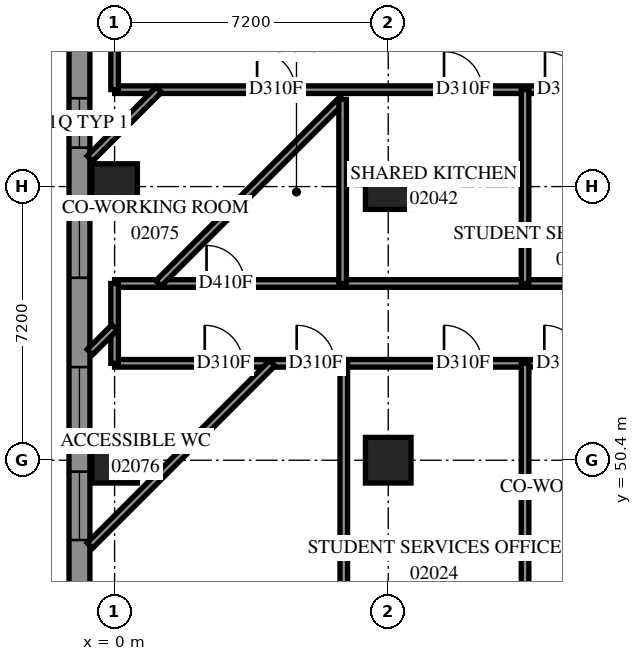
"""IFC4 building model, lengths in metres.
Left out: names, types, materials, properties, quantities, classifications, styles, units other than length and angle.
Written with IfcOpenShell. Run it as: python <this file> out.ifc"""

import sys

from ifc_helpers import new_model, si_unit, direction, frame, frame_2d, origin, origin_2d, place, context, subcontext, project, spatial, polyline, rectangle, outline, extrude, element, fill, save


model = new_model("IFC4")
c1 = context("Model", 3, precision=1e-05, world=origin(), true_north=direction((0.0, 1.0)))
c2 = subcontext(c1, "Body", "Model", "MODEL_VIEW")
j1 = project(units=[si_unit("LENGTHUNIT", "METRE"), si_unit("PLANEANGLEUNIT", "RADIAN")], contexts=[c1])
p1 = place(None, origin())
s1 = spatial("IfcSite", under=j1, at=p1, CompositionType="ELEMENT")
p2 = place(p1, origin())
s2 = spatial("IfcBuilding", under=s1, at=p2, CompositionType="ELEMENT")
p3 = place(p2, frame((0.0, 0.0, 10.2)))
s3 = spatial("IfcBuildingStorey", under=s2, at=p3, CompositionType="ELEMENT", Elevation=10.2)
for number, where, z_axis, x_axis in (
    (1, (0.0, 50.4, 0.0), (0.0, 0.0, 1.0), (1.0, 0.0, 0.0)),
    (2, (0.0, 57.6, 0.0), (0.0, 0.0, 1.0), (1.0, 0.0, 0.0)),
    (3, (7.2, 50.4, 0.0), (0.0, 0.0, 1.0), (1.0, 0.0, 0.0)),
    (4, (7.2, 57.6, 0.0), (0.0, 0.0, 1.0), (1.0, 0.0, 0.0)),
):
    element("IfcColumn", number, at=place(p3, frame(where, z_axis=z_axis, x_axis=x_axis)), inside=s3, PredefinedType="COLUMN", context=c2, shape_type="SweptSolid", body=[
        extrude(rectangle(XDim=1.2, YDim=1.2, at=origin_2d()), origin(), (0.0, 0.0, 1.0), 3.8),
    ])
p4 = place(p3, frame((-0.925, 71.725, 0.0), z_axis=(0.0, 0.0, 1.0), x_axis=(0.0, -1.0, 0.0)))
e5 = element("IfcWall", 5, at=p4, inside=s3, PredefinedType="SOLIDWALL", context=c2, shape_type="SweptSolid", body=[
    extrude(outline(polyline([(-0.275, -0.275), (28.525, -0.275), (27.975, 0.275), (0.275, 0.275), (-0.275, -0.275)])), origin(), (0.0, 0.0, 1.0), 3.8),
])
p5 = place(p4, frame((1.0, 0.0, 0.7)))
e6 = element("IfcOpeningElement", 6, at=p5, cuts=e5, PredefinedType="OPENING", context=c2, shape_type="SweptSolid", body=[
    extrude(rectangle(XDim=1.8, YDim=2.6, at=frame_2d((0.9, 1.3))), frame((0.0, 0.285, 0.0), z_axis=(0.0, -1.0, 0.0), x_axis=(1.0, 0.0, 0.0)), (0.0, 0.0, 1.0), 0.57),
])
p6 = place(p4, frame((4.225, 0.0, 0.7)))
e7 = element("IfcOpeningElement", 7, at=p6, cuts=e5, PredefinedType="OPENING", context=c2, shape_type="SweptSolid", body=[
    extrude(rectangle(XDim=1.8, YDim=2.6, at=frame_2d((0.9, 1.3))), frame((0.0, 0.285, 0.0), z_axis=(0.0, -1.0, 0.0), x_axis=(1.0, 0.0, 0.0)), (0.0, 0.0, 1.0), 0.57),
])
p7 = place(p4, frame((7.525, 0.0, 0.7)))
e8 = element("IfcOpeningElement", 8, at=p7, cuts=e5, PredefinedType="OPENING", context=c2, shape_type="SweptSolid", body=[
    extrude(rectangle(XDim=1.8, YDim=2.6, at=frame_2d((0.9, 1.3))), frame((0.0, 0.285, 0.0), z_axis=(0.0, -1.0, 0.0), x_axis=(1.0, 0.0, 0.0)), (0.0, 0.0, 1.0), 0.57),
])
p8 = place(p4, frame((14.725, 0.0, 0.7)))
e9 = element("IfcOpeningElement", 9, at=p8, cuts=e5, PredefinedType="OPENING", context=c2, shape_type="SweptSolid", body=[
    extrude(rectangle(XDim=1.8, YDim=2.6, at=frame_2d((0.9, 1.3))), frame((0.0, 0.285, 0.0), z_axis=(0.0, -1.0, 0.0), x_axis=(1.0, 0.0, 0.0)), (0.0, 0.0, 1.0), 0.57),
])
p9 = place(p4, frame((18.875, 0.0, 0.7)))
e10 = element("IfcOpeningElement", 10, at=p9, cuts=e5, PredefinedType="OPENING", context=c2, shape_type="SweptSolid", body=[
    extrude(rectangle(XDim=1.8, YDim=2.6, at=frame_2d((0.9, 1.3))), frame((0.0, 0.285, 0.0), z_axis=(0.0, -1.0, 0.0), x_axis=(1.0, 0.0, 0.0)), (0.0, 0.0, 1.0), 0.57),
])
p10 = place(p4, frame((21.625, 0.0, 0.7)))
e11 = element("IfcOpeningElement", 11, at=p10, cuts=e5, PredefinedType="OPENING", context=c2, shape_type="SweptSolid", body=[
    extrude(rectangle(XDim=1.8, YDim=2.6, at=frame_2d((0.9, 1.3))), frame((0.0, 0.285, 0.0), z_axis=(0.0, -1.0, 0.0), x_axis=(1.0, 0.0, 0.0)), (0.0, 0.0, 1.0), 0.57),
])
p11 = place(p4, frame((25.45, 0.0, 0.7)))
e12 = element("IfcOpeningElement", 12, at=p11, cuts=e5, PredefinedType="OPENING", context=c2, shape_type="SweptSolid", body=[
    extrude(rectangle(XDim=1.8, YDim=2.6, at=frame_2d((0.9, 1.3))), frame((0.0, 0.285, 0.0), z_axis=(0.0, -1.0, 0.0), x_axis=(1.0, 0.0, 0.0)), (0.0, 0.0, 1.0), 0.57),
])
p12 = place(p4, frame((11.8, 0.0, 0.45)))
e13 = element("IfcOpeningElement", 13, at=p12, cuts=e5, PredefinedType="OPENING", context=c2, shape_type="SweptSolid", body=[
    extrude(rectangle(XDim=1.3, YDim=2.5, at=frame_2d((0.65, 1.25))), frame((0.0, 0.285, 0.0), z_axis=(0.0, -1.0, 0.0), x_axis=(1.0, 0.0, 0.0)), (0.0, 0.0, 1.0), 0.57),
])
p13 = place(p3, frame((0.0, 55.05, 0.0), z_axis=(0.0, 0.0, 1.0), x_axis=(1.0, 0.0, 0.0)))
e14 = element("IfcWall", 14, at=p13, inside=s3, PredefinedType="PARTITIONING", context=c2, shape_type="SweptSolid", body=[
    extrude(rectangle(XDim=54.5, YDim=0.2, at=frame_2d((27.25, 0.0))), origin(), (0.0, 0.0, 1.0), 3.8),
])
p14 = place(p13, frame((52.452, 0.0, 0.0)))
e15 = element("IfcOpeningElement", 15, at=p14, cuts=e14, PredefinedType="OPENING", context=c2, shape_type="SweptSolid", body=[
    extrude(rectangle(XDim=1.0, YDim=2.1, at=frame_2d((0.5, 1.05))), frame((0.0, 0.11, 0.0), z_axis=(0.0, -1.0, 0.0), x_axis=(1.0, 0.0, 0.0)), (0.0, 0.0, 1.0), 0.22),
])
p15 = place(p13, frame((2.42, 0.0, 0.0)))
e16 = element("IfcOpeningElement", 16, at=p15, cuts=e14, PredefinedType="OPENING", context=c2, shape_type="SweptSolid", body=[
    extrude(rectangle(XDim=1.0, YDim=2.1, at=frame_2d((0.5, 1.05))), frame((0.0, 0.11, 0.0), z_axis=(0.0, -1.0, 0.0), x_axis=(1.0, 0.0, 0.0)), (0.0, 0.0, 1.0), 0.22),
])
p16 = place(p3, frame((0.0, 52.95, 0.0), z_axis=(0.0, 0.0, 1.0), x_axis=(1.0, 0.0, 0.0)))
e17 = element("IfcWall", 17, at=p16, inside=s3, PredefinedType="PARTITIONING", context=c2, shape_type="SweptSolid", body=[
    extrude(rectangle(XDim=54.5, YDim=0.2, at=frame_2d((27.25, 0.0))), origin(), (0.0, 0.0, 1.0), 3.8),
])
p17 = place(p16, frame((8.669, 0.0, 0.0)))
e18 = element("IfcOpeningElement", 18, at=p17, cuts=e17, PredefinedType="OPENING", context=c2, shape_type="SweptSolid", body=[
    extrude(rectangle(XDim=1.0, YDim=2.1, at=frame_2d((0.5, 1.05))), frame((0.0, 0.11, 0.0), z_axis=(0.0, -1.0, 0.0), x_axis=(1.0, 0.0, 0.0)), (0.0, 0.0, 1.0), 0.22),
])
p18 = place(p16, frame((11.307, 0.0, 0.0)))
e19 = element("IfcOpeningElement", 19, at=p18, cuts=e17, PredefinedType="OPENING", context=c2, shape_type="SweptSolid", body=[
    extrude(rectangle(XDim=1.0, YDim=2.1, at=frame_2d((0.5, 1.05))), frame((0.0, 0.11, 0.0), z_axis=(0.0, -1.0, 0.0), x_axis=(1.0, 0.0, 0.0)), (0.0, 0.0, 1.0), 0.22),
])
p19 = place(p16, frame((16.433, 0.0, 0.0)))
e20 = element("IfcOpeningElement", 20, at=p19, cuts=e17, PredefinedType="OPENING", context=c2, shape_type="SweptSolid", body=[
    extrude(rectangle(XDim=1.0, YDim=2.1, at=frame_2d((0.5, 1.05))), frame((0.0, 0.11, 0.0), z_axis=(0.0, -1.0, 0.0), x_axis=(1.0, 0.0, 0.0)), (0.0, 0.0, 1.0), 0.22),
])
p20 = place(p16, frame((22.025, 0.0, 0.0)))
e21 = element("IfcOpeningElement", 21, at=p20, cuts=e17, PredefinedType="OPENING", context=c2, shape_type="SweptSolid", body=[
    extrude(rectangle(XDim=1.0, YDim=2.1, at=frame_2d((0.5, 1.05))), frame((0.0, 0.11, 0.0), z_axis=(0.0, -1.0, 0.0), x_axis=(1.0, 0.0, 0.0)), (0.0, 0.0, 1.0), 0.22),
])
p21 = place(p16, frame((30.565, 0.0, 0.0)))
e22 = element("IfcOpeningElement", 22, at=p21, cuts=e17, PredefinedType="OPENING", context=c2, shape_type="SweptSolid", body=[
    extrude(rectangle(XDim=1.0, YDim=2.1, at=frame_2d((0.5, 1.05))), frame((0.0, 0.11, 0.0), z_axis=(0.0, -1.0, 0.0), x_axis=(1.0, 0.0, 0.0)), (0.0, 0.0, 1.0), 0.22),
])
p22 = place(p16, frame((32.925, 0.0, 0.0)))
e23 = element("IfcOpeningElement", 23, at=p22, cuts=e17, PredefinedType="OPENING", context=c2, shape_type="SweptSolid", body=[
    extrude(rectangle(XDim=1.0, YDim=2.1, at=frame_2d((0.5, 1.05))), frame((0.0, 0.11, 0.0), z_axis=(0.0, -1.0, 0.0), x_axis=(1.0, 0.0, 0.0)), (0.0, 0.0, 1.0), 0.22),
])
p23 = place(p16, frame((37.765, 0.0, 0.0)))
e24 = element("IfcOpeningElement", 24, at=p23, cuts=e17, PredefinedType="OPENING", context=c2, shape_type="SweptSolid", body=[
    extrude(rectangle(XDim=1.0, YDim=2.1, at=frame_2d((0.5, 1.05))), frame((0.0, 0.11, 0.0), z_axis=(0.0, -1.0, 0.0), x_axis=(1.0, 0.0, 0.0)), (0.0, 0.0, 1.0), 0.22),
])
p24 = place(p16, frame((40.125, 0.0, 0.0)))
e25 = element("IfcOpeningElement", 25, at=p24, cuts=e17, PredefinedType="OPENING", context=c2, shape_type="SweptSolid", body=[
    extrude(rectangle(XDim=1.0, YDim=2.1, at=frame_2d((0.5, 1.05))), frame((0.0, 0.11, 0.0), z_axis=(0.0, -1.0, 0.0), x_axis=(1.0, 0.0, 0.0)), (0.0, 0.0, 1.0), 0.22),
])
p25 = place(p16, frame((44.965, 0.0, 0.0)))
e26 = element("IfcOpeningElement", 26, at=p25, cuts=e17, PredefinedType="OPENING", context=c2, shape_type="SweptSolid", body=[
    extrude(rectangle(XDim=1.0, YDim=2.1, at=frame_2d((0.5, 1.05))), frame((0.0, 0.11, 0.0), z_axis=(0.0, -1.0, 0.0), x_axis=(1.0, 0.0, 0.0)), (0.0, 0.0, 1.0), 0.22),
])
p26 = place(p16, frame((47.325, 0.0, 0.0)))
e27 = element("IfcOpeningElement", 27, at=p26, cuts=e17, PredefinedType="OPENING", context=c2, shape_type="SweptSolid", body=[
    extrude(rectangle(XDim=1.0, YDim=2.1, at=frame_2d((0.5, 1.05))), frame((0.0, 0.11, 0.0), z_axis=(0.0, -1.0, 0.0), x_axis=(1.0, 0.0, 0.0)), (0.0, 0.0, 1.0), 0.22),
])
p27 = place(p16, frame((52.165, 0.0, 0.0)))
e28 = element("IfcOpeningElement", 28, at=p27, cuts=e17, PredefinedType="OPENING", context=c2, shape_type="SweptSolid", body=[
    extrude(rectangle(XDim=1.0, YDim=2.1, at=frame_2d((0.5, 1.05))), frame((0.0, 0.11, 0.0), z_axis=(0.0, -1.0, 0.0), x_axis=(1.0, 0.0, 0.0)), (0.0, 0.0, 1.0), 0.22),
])
p28 = place(p16, frame((2.372, 0.0, 0.0)))
e29 = element("IfcOpeningElement", 29, at=p28, cuts=e17, PredefinedType="OPENING", context=c2, shape_type="SweptSolid", body=[
    extrude(rectangle(XDim=1.0, YDim=2.1, at=frame_2d((0.5, 1.05))), frame((0.0, 0.11, 0.0), z_axis=(0.0, -1.0, 0.0), x_axis=(1.0, 0.0, 0.0)), (0.0, 0.0, 1.0), 0.22),
])
p29 = place(p16, frame((4.792, 0.0, 0.0)))
e30 = element("IfcOpeningElement", 30, at=p29, cuts=e17, PredefinedType="OPENING", context=c2, shape_type="SweptSolid", body=[
    extrude(rectangle(XDim=1.0, YDim=2.1, at=frame_2d((0.5, 1.05))), frame((0.0, 0.11, 0.0), z_axis=(0.0, -1.0, 0.0), x_axis=(1.0, 0.0, 0.0)), (0.0, 0.0, 1.0), 0.22),
])
p30 = place(p3, frame((0.002, 60.15, 0.0), z_axis=(0.0, 0.0, 1.0), x_axis=(1.0, 0.0, 0.0)))
e31 = element("IfcWall", 31, at=p30, inside=s3, PredefinedType="PARTITIONING", context=c2, shape_type="SweptSolid", body=[
    extrude(rectangle(XDim=54.498, YDim=0.2, at=frame_2d((27.249, 0.0))), origin(), (0.0, 0.0, 1.0), 3.8),
])
p31 = place(p30, frame((8.667, 0.0, 0.0)))
e32 = element("IfcOpeningElement", 32, at=p31, cuts=e31, PredefinedType="OPENING", context=c2, shape_type="SweptSolid", body=[
    extrude(rectangle(XDim=1.0, YDim=2.1, at=frame_2d((0.5, 1.05))), frame((0.0, 0.11, 0.0), z_axis=(0.0, -1.0, 0.0), x_axis=(1.0, 0.0, 0.0)), (0.0, 0.0, 1.0), 0.22),
])
p32 = place(p30, frame((11.323, 0.0, 0.0)))
e33 = element("IfcOpeningElement", 33, at=p32, cuts=e31, PredefinedType="OPENING", context=c2, shape_type="SweptSolid", body=[
    extrude(rectangle(XDim=1.0, YDim=2.1, at=frame_2d((0.5, 1.05))), frame((0.0, 0.11, 0.0), z_axis=(0.0, -1.0, 0.0), x_axis=(1.0, 0.0, 0.0)), (0.0, 0.0, 1.0), 0.22),
])
p33 = place(p30, frame((16.163, 0.0, 0.0)))
e34 = element("IfcOpeningElement", 34, at=p33, cuts=e31, PredefinedType="OPENING", context=c2, shape_type="SweptSolid", body=[
    extrude(rectangle(XDim=1.0, YDim=2.1, at=frame_2d((0.5, 1.05))), frame((0.0, 0.11, 0.0), z_axis=(0.0, -1.0, 0.0), x_axis=(1.0, 0.0, 0.0)), (0.0, 0.0, 1.0), 0.22),
])
p34 = place(p30, frame((22.14, 0.0, 0.0)))
e35 = element("IfcOpeningElement", 35, at=p34, cuts=e31, PredefinedType="OPENING", context=c2, shape_type="SweptSolid", body=[
    extrude(rectangle(XDim=1.0, YDim=2.1, at=frame_2d((0.5, 1.05))), frame((0.0, 0.11, 0.0), z_axis=(0.0, -1.0, 0.0), x_axis=(1.0, 0.0, 0.0)), (0.0, 0.0, 1.0), 0.22),
])
p35 = place(p30, frame((30.563, 0.0, 0.0)))
e36 = element("IfcOpeningElement", 36, at=p35, cuts=e31, PredefinedType="OPENING", context=c2, shape_type="SweptSolid", body=[
    extrude(rectangle(XDim=1.0, YDim=2.1, at=frame_2d((0.5, 1.05))), frame((0.0, 0.11, 0.0), z_axis=(0.0, -1.0, 0.0), x_axis=(1.0, 0.0, 0.0)), (0.0, 0.0, 1.0), 0.22),
])
p36 = place(p30, frame((33.233, 0.0, 0.0)))
e37 = element("IfcOpeningElement", 37, at=p36, cuts=e31, PredefinedType="OPENING", context=c2, shape_type="SweptSolid", body=[
    extrude(rectangle(XDim=1.0, YDim=2.1, at=frame_2d((0.5, 1.05))), frame((0.0, 0.11, 0.0), z_axis=(0.0, -1.0, 0.0), x_axis=(1.0, 0.0, 0.0)), (0.0, 0.0, 1.0), 0.22),
])
p37 = place(p30, frame((38.073, 0.0, 0.0)))
e38 = element("IfcOpeningElement", 38, at=p37, cuts=e31, PredefinedType="OPENING", context=c2, shape_type="SweptSolid", body=[
    extrude(rectangle(XDim=1.0, YDim=2.1, at=frame_2d((0.5, 1.05))), frame((0.0, 0.11, 0.0), z_axis=(0.0, -1.0, 0.0), x_axis=(1.0, 0.0, 0.0)), (0.0, 0.0, 1.0), 0.22),
])
p38 = place(p30, frame((40.123, 0.0, 0.0)))
e39 = element("IfcOpeningElement", 39, at=p38, cuts=e31, PredefinedType="OPENING", context=c2, shape_type="SweptSolid", body=[
    extrude(rectangle(XDim=1.0, YDim=2.1, at=frame_2d((0.5, 1.05))), frame((0.0, 0.11, 0.0), z_axis=(0.0, -1.0, 0.0), x_axis=(1.0, 0.0, 0.0)), (0.0, 0.0, 1.0), 0.22),
])
p39 = place(p30, frame((44.963, 0.0, 0.0)))
e40 = element("IfcOpeningElement", 40, at=p39, cuts=e31, PredefinedType="OPENING", context=c2, shape_type="SweptSolid", body=[
    extrude(rectangle(XDim=1.0, YDim=2.1, at=frame_2d((0.5, 1.05))), frame((0.0, 0.11, 0.0), z_axis=(0.0, -1.0, 0.0), x_axis=(1.0, 0.0, 0.0)), (0.0, 0.0, 1.0), 0.22),
])
p40 = place(p30, frame((47.323, 0.0, 0.0)))
e41 = element("IfcOpeningElement", 41, at=p40, cuts=e31, PredefinedType="OPENING", context=c2, shape_type="SweptSolid", body=[
    extrude(rectangle(XDim=1.0, YDim=2.1, at=frame_2d((0.5, 1.05))), frame((0.0, 0.11, 0.0), z_axis=(0.0, -1.0, 0.0), x_axis=(1.0, 0.0, 0.0)), (0.0, 0.0, 1.0), 0.22),
])
p41 = place(p30, frame((3.747, 0.0, 0.0)))
e42 = element("IfcOpeningElement", 42, at=p41, cuts=e31, PredefinedType="OPENING", context=c2, shape_type="SweptSolid", body=[
    extrude(rectangle(XDim=1.0, YDim=2.1, at=frame_2d((0.5, 1.05))), frame((0.0, 0.11, 0.0), z_axis=(0.0, -1.0, 0.0), x_axis=(1.0, 0.0, 0.0)), (0.0, 0.0, 1.0), 0.22),
])
for number, where, z_axis, x_axis in (
    (43, (6.03, 42.55, 0.0), (0.0, 0.0, 1.0), (0.0, 1.0, 0.0)),
    (44, (10.8, 42.55, 0.0), (0.0, 0.0, 1.0), (0.0, 1.0, 0.0)),
):
    element("IfcWall", number, at=place(p3, frame(where, z_axis=z_axis, x_axis=x_axis)), inside=s3, PredefinedType="PARTITIONING", context=c2, shape_type="SweptSolid", body=[
        extrude(rectangle(XDim=10.4, YDim=0.2, at=frame_2d((5.2, 0.0))), origin(), (0.0, 0.0, 1.0), 3.8),
    ])
p42 = place(p3, frame((1.155, 55.051, 0.0), z_axis=(0.0, 0.0, 1.0), x_axis=(0.7071067812, 0.7071067812, 0.0)))
e45 = element("IfcWall", 45, at=p42, inside=s3, PredefinedType="PARTITIONING", context=c2, shape_type="SweptSolid", body=[
    extrude(rectangle(XDim=6.851, YDim=0.2, at=frame_2d((3.425, 0.0))), origin(), (0.0, 0.0, 1.0), 3.8),
])
p43 = place(p3, frame((-0.65, 48.154, 0.0), z_axis=(0.0, 0.0, 1.0), x_axis=(0.7070994105, 0.7071141518, 0.0)))
e46 = element("IfcWall", 46, at=p43, inside=s3, PredefinedType="PARTITIONING", context=c2, shape_type="SweptSolid", body=[
    extrude(rectangle(XDim=6.784, YDim=0.2, at=frame_2d((3.392, 0.0))), origin(), (0.0, 0.0, 1.0), 3.8),
])
p44 = place(p3, frame((10.8, 55.05, 0.0), z_axis=(0.0, 0.0, 1.0), x_axis=(0.0, 1.0, 0.0)))
e47 = element("IfcWall", 47, at=p44, inside=s3, PredefinedType="PARTITIONING", context=c2, shape_type="SweptSolid", body=[
    extrude(rectangle(XDim=5.1, YDim=0.2, at=frame_2d((2.55, 0.0))), origin(), (0.0, 0.0, 1.0), 3.8),
])
p45 = place(p3, frame((6.0, 55.05, 0.0), z_axis=(0.0, 0.0, 1.0), x_axis=(0.0, 1.0, 0.0)))
e48 = element("IfcWall", 48, at=p45, inside=s3, PredefinedType="PARTITIONING", context=c2, shape_type="SweptSolid", body=[
    extrude(rectangle(XDim=4.844, YDim=0.2, at=frame_2d((2.422, 0.0))), origin(), (0.0, 0.0, 1.0), 3.8),
])
p46 = place(p3, frame((-0.65, 58.337, 0.0), z_axis=(0.0, 0.0, 1.0), x_axis=(0.7071067812, 0.7071067812, 0.0)))
e49 = element("IfcWall", 49, at=p46, inside=s3, PredefinedType="PARTITIONING", context=c2, shape_type="SweptSolid", body=[
    extrude(rectangle(XDim=2.565, YDim=0.2, at=frame_2d((1.282, 0.0))), origin(), (0.0, 0.0, 1.0), 3.8),
])
p47 = place(p3, frame((0.0, 52.95, 0.0), z_axis=(0.0, 0.0, 1.0), x_axis=(0.0, 1.0, 0.0)))
e50 = element("IfcWall", 50, at=p47, inside=s3, PredefinedType="PARTITIONING", context=c2, shape_type="SweptSolid", body=[
    extrude(rectangle(XDim=2.1, YDim=0.2, at=frame_2d((1.05, 0.0))), origin(), (0.0, 0.0, 1.0), 3.2),
])
p48 = place(p3, frame((0.0, 60.152, 0.0), z_axis=(0.0, 0.0, 1.0), x_axis=(0.0, 1.0, 0.0)))
e51 = element("IfcWall", 51, at=p48, inside=s3, PredefinedType="PARTITIONING", context=c2, shape_type="SweptSolid", body=[
    extrude(rectangle(XDim=2.096, YDim=0.2, at=frame_2d((1.048, 0.0))), origin(), (0.0, 0.0, 1.0), 3.2),
])
p49 = place(p3, frame((-0.65, 53.246, 0.0), z_axis=(0.0, 0.0, 1.0), x_axis=(0.7071612431, 0.707052315, 0.0)))
e52 = element("IfcWall", 52, at=p49, inside=s3, PredefinedType="PARTITIONING", context=c2, shape_type="SweptSolid", body=[
    extrude(rectangle(XDim=0.918, YDim=0.2, at=frame_2d((0.459, 0.0))), origin(), (0.0, 0.0, 1.0), 3.8),
])
p50 = place(p8, origin())
e53 = element("IfcWindow", 53, at=p50, inside=s3, PartitioningType="SINGLE_PANEL", PredefinedType="WINDOW", context=c2, shape_type="SweptSolid", body=[
    extrude(rectangle(XDim=1.8, YDim=2.6, at=frame_2d((0.9, 1.3))), frame((0.0, 0.155, 0.0), z_axis=(0.0, -1.0, 0.0), x_axis=(1.0, 0.0, 0.0)), (0.0, 0.0, 1.0), 0.06),
])
fill(e9, e53)
p51 = place(p9, origin())
e54 = element("IfcWindow", 54, at=p51, inside=s3, PartitioningType="SINGLE_PANEL", PredefinedType="WINDOW", context=c2, shape_type="SweptSolid", body=[
    extrude(rectangle(XDim=1.8, YDim=2.6, at=frame_2d((0.9, 1.3))), frame((0.0, 0.155, 0.0), z_axis=(0.0, -1.0, 0.0), x_axis=(1.0, 0.0, 0.0)), (0.0, 0.0, 1.0), 0.06),
])
fill(e10, e54)
p52 = place(p10, origin())
e55 = element("IfcWindow", 55, at=p52, inside=s3, PartitioningType="SINGLE_PANEL", PredefinedType="WINDOW", context=c2, shape_type="SweptSolid", body=[
    extrude(rectangle(XDim=1.8, YDim=2.6, at=frame_2d((0.9, 1.3))), frame((0.0, 0.155, 0.0), z_axis=(0.0, -1.0, 0.0), x_axis=(1.0, 0.0, 0.0)), (0.0, 0.0, 1.0), 0.06),
])
fill(e11, e55)
p53 = place(p17, origin())
e56 = element("IfcDoor", 56, at=p53, inside=s3, OperationType="SINGLE_SWING_LEFT", PredefinedType="DOOR", context=c2, shape_type="SweptSolid", body=[
    extrude(rectangle(XDim=1.0, YDim=2.1, at=frame_2d((0.5, 1.05))), frame((0.0, 0.025, 0.0), z_axis=(0.0, -1.0, 0.0), x_axis=(1.0, 0.0, 0.0)), (0.0, 0.0, 1.0), 0.05),
])
fill(e18, e56)
p54 = place(p18, origin())
e57 = element("IfcDoor", 57, at=p54, inside=s3, OperationType="SINGLE_SWING_RIGHT", PredefinedType="DOOR", context=c2, shape_type="SweptSolid", body=[
    extrude(rectangle(XDim=1.0, YDim=2.1, at=frame_2d((0.5, 1.05))), frame((0.0, 0.025, 0.0), z_axis=(0.0, -1.0, 0.0), x_axis=(1.0, 0.0, 0.0)), (0.0, 0.0, 1.0), 0.05),
])
fill(e19, e57)
p55 = place(p31, origin())
e58 = element("IfcDoor", 58, at=p55, inside=s3, OperationType="SINGLE_SWING_LEFT", PredefinedType="DOOR", context=c2, shape_type="SweptSolid", body=[
    extrude(rectangle(XDim=1.0, YDim=2.1, at=frame_2d((0.5, 1.05))), frame((0.0, 0.025, 0.0), z_axis=(0.0, -1.0, 0.0), x_axis=(1.0, 0.0, 0.0)), (0.0, 0.0, 1.0), 0.05),
])
fill(e32, e58)
p56 = place(p32, origin())
e59 = element("IfcDoor", 59, at=p56, inside=s3, OperationType="SINGLE_SWING_RIGHT", PredefinedType="DOOR", context=c2, shape_type="SweptSolid", body=[
    extrude(rectangle(XDim=1.0, YDim=2.1, at=frame_2d((0.5, 1.05))), frame((0.0, 0.025, 0.0), z_axis=(0.0, -1.0, 0.0), x_axis=(1.0, 0.0, 0.0)), (0.0, 0.0, 1.0), 0.05),
])
fill(e33, e59)
p57 = place(p41, origin())
e60 = element("IfcDoor", 60, at=p57, inside=s3, OperationType="SINGLE_SWING_LEFT", PredefinedType="DOOR", context=c2, shape_type="SweptSolid", body=[
    extrude(rectangle(XDim=1.0, YDim=2.1, at=frame_2d((0.5, 1.05))), frame((0.0, 0.025, 0.0), z_axis=(0.0, -1.0, 0.0), x_axis=(1.0, 0.0, 0.0)), (0.0, 0.0, 1.0), 0.05),
])
fill(e42, e60)
p58 = place(p28, origin())
e61 = element("IfcDoor", 61, at=p58, inside=s3, OperationType="SINGLE_SWING_RIGHT", PredefinedType="DOOR", context=c2, shape_type="SweptSolid", body=[
    extrude(rectangle(XDim=1.0, YDim=2.1, at=frame_2d((0.5, 1.05))), frame((0.0, 0.025, 0.0), z_axis=(0.0, -1.0, 0.0), x_axis=(1.0, 0.0, 0.0)), (0.0, 0.0, 1.0), 0.05),
])
fill(e29, e61)
p59 = place(p15, origin())
e62 = element("IfcDoor", 62, at=p59, inside=s3, OperationType="SINGLE_SWING_LEFT", PredefinedType="DOOR", context=c2, shape_type="SweptSolid", body=[
    extrude(rectangle(XDim=1.0, YDim=2.1, at=frame_2d((0.5, 1.05))), frame((0.0, 0.025, 0.0), z_axis=(0.0, -1.0, 0.0), x_axis=(1.0, 0.0, 0.0)), (0.0, 0.0, 1.0), 0.05),
])
fill(e16, e62)
p60 = place(p29, origin())
e63 = element("IfcDoor", 63, at=p60, inside=s3, OperationType="SINGLE_SWING_LEFT", PredefinedType="DOOR", context=c2, shape_type="SweptSolid", body=[
    extrude(rectangle(XDim=1.0, YDim=2.1, at=frame_2d((0.5, 1.05))), frame((0.0, 0.025, 0.0), z_axis=(0.0, -1.0, 0.0), x_axis=(1.0, 0.0, 0.0)), (0.0, 0.0, 1.0), 0.05),
])
fill(e30, e63)
p61 = place(p12, origin())
e64 = element("IfcWindow", 64, at=p61, inside=s3, PartitioningType="SINGLE_PANEL", PredefinedType="WINDOW", context=c2, shape_type="SweptSolid", body=[
    extrude(rectangle(XDim=1.3, YDim=2.5, at=frame_2d((0.65, 1.25))), frame((0.0, 0.155, 0.0), z_axis=(0.0, -1.0, 0.0), x_axis=(1.0, 0.0, 0.0)), (0.0, 0.0, 1.0), 0.06),
])
fill(e13, e64)
save(model, sys.argv[1])
